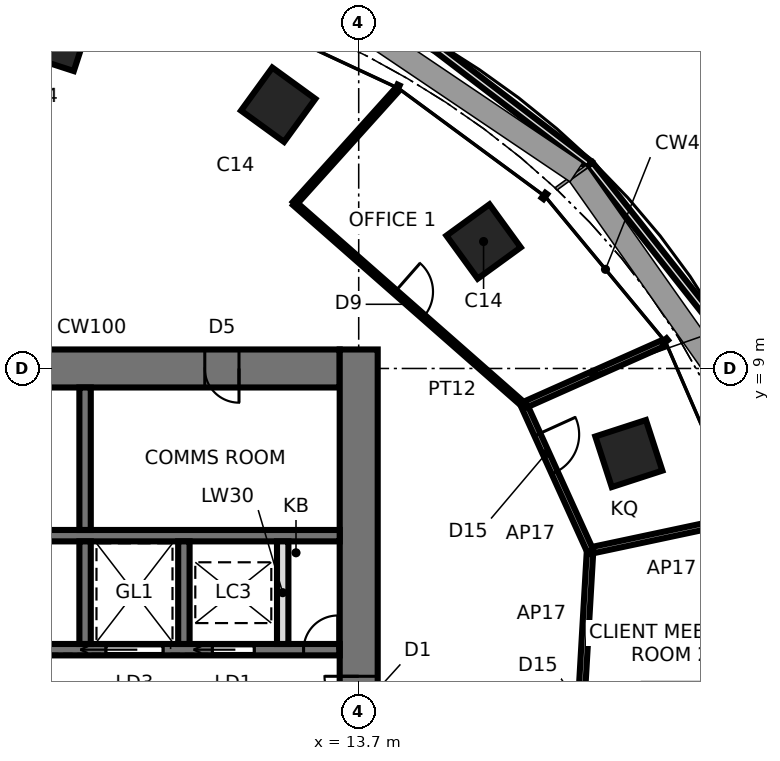
"""IFC4 building model, lengths in metres.
Left out: names, types, materials, properties, quantities, classifications, styles, units other than length and angle.
Written with IfcOpenShell. Run it as: python <this file> out.ifc"""

import sys

from ifc_helpers import new_model, si_unit, direction, frame, frame_2d, origin, origin_2d, place, context, subcontext, project, spatial, rectangle, extrude, element, fill, save


model = new_model("IFC4")
c1 = context("Model", 3, precision=1e-05, world=origin(), true_north=direction((0.0, 1.0)))
c2 = subcontext(c1, "Body", "Model", "MODEL_VIEW")
j1 = project(units=[si_unit("LENGTHUNIT", "METRE"), si_unit("PLANEANGLEUNIT", "RADIAN")], contexts=[c1])
p1 = place(None, origin())
s1 = spatial("IfcSite", under=j1, at=p1, CompositionType="ELEMENT")
p2 = place(p1, origin())
s2 = spatial("IfcBuilding", under=s1, at=p2, CompositionType="ELEMENT")
p3 = place(p2, frame((0.0, 0.0, 172.1)))
s3 = spatial("IfcBuildingStorey", under=s2, at=p3, CompositionType="ELEMENT", Elevation=172.1)
for number, where, z_axis, x_axis in (
    (1, (20.808, 6.761, 0.0), (0.0, 0.0, 1.0), (0.951, 0.309, 0.0)),
    (2, (16.986, 12.341, 0.0), (0.0, 0.0, 1.0), (0.809, 0.588, 0.0)),
    (3, (11.581, 15.94, 0.0), (0.0, 0.0, 1.0), (0.588, 0.809, 0.0)),
    (4, (5.754, 17.708, 0.0), (0.0, 0.0, 1.0), (0.309, 0.951, 0.0)),
):
    element("IfcColumn", number, at=place(p3, frame(where, z_axis=z_axis, x_axis=x_axis)), inside=s3, PredefinedType="COLUMN", context=c2, shape_type="SweptSolid", body=[
        extrude(rectangle(XDim=1.4, YDim=1.4, at=origin_2d()), origin(), (0.0, 0.0, 1.0), 3.9),
    ])
p4 = place(p3, frame((13.2, 9.0, 0.0), z_axis=(0.0, 0.0, 1.0), x_axis=(-1.0, 0.0, 0.0)))
e5 = element("IfcWall", 5, at=p4, inside=s3, PredefinedType="SHEAR", context=c2, shape_type="SweptSolid", body=[
    extrude(rectangle(XDim=26.4, YDim=1.0, at=frame_2d((13.2, 0.0))), origin(), (0.0, 0.0, 1.0), 3.9),
])
p5 = place(p4, frame((2.65, 0.0, 0.0)))
e6 = element("IfcOpeningElement", 6, at=p5, cuts=e5, PredefinedType="OPENING", context=c2, shape_type="SweptSolid", body=[
    extrude(rectangle(XDim=0.9, YDim=2.1, at=frame_2d((0.45, 1.05))), frame((0.0, 0.51, 0.0), z_axis=(0.0, -1.0, 0.0), x_axis=(1.0, 0.0, 0.0)), (0.0, 0.0, 1.0), 1.02),
])
p6 = place(p4, frame((9.5, 0.0, 0.0)))
e7 = element("IfcOpeningElement", 7, at=p6, cuts=e5, PredefinedType="OPENING", context=c2, shape_type="SweptSolid", body=[
    extrude(rectangle(XDim=0.9, YDim=2.1, at=frame_2d((0.45, 1.05))), frame((0.0, 0.51, 0.0), z_axis=(0.0, -1.0, 0.0), x_axis=(1.0, 0.0, 0.0)), (0.0, 0.0, 1.0), 1.02),
])
p7 = place(p4, frame((16.0, 0.0, 0.0)))
e8 = element("IfcOpeningElement", 8, at=p7, cuts=e5, PredefinedType="OPENING", context=c2, shape_type="SweptSolid", body=[
    extrude(rectangle(XDim=0.9, YDim=2.1, at=frame_2d((0.45, 1.05))), frame((0.0, 0.51, 0.0), z_axis=(0.0, -1.0, 0.0), x_axis=(1.0, 0.0, 0.0)), (0.0, 0.0, 1.0), 1.02),
])
p8 = place(p4, frame((21.25, 0.0, 0.0)))
e9 = element("IfcOpeningElement", 9, at=p8, cuts=e5, PredefinedType="OPENING", context=c2, shape_type="SweptSolid", body=[
    extrude(rectangle(XDim=0.9, YDim=2.1, at=frame_2d((0.45, 1.05))), frame((0.0, 0.51, 0.0), z_axis=(0.0, -1.0, 0.0), x_axis=(1.0, 0.0, 0.0)), (0.0, 0.0, 1.0), 1.02),
])
p9 = place(p4, frame((24.8, 0.0, 0.0)))
e10 = element("IfcOpeningElement", 10, at=p9, cuts=e5, PredefinedType="OPENING", context=c2, shape_type="SweptSolid", body=[
    extrude(rectangle(XDim=1.0, YDim=2.1, at=frame_2d((0.5, 1.05))), frame((0.0, 0.51, 0.0), z_axis=(0.0, -1.0, 0.0), x_axis=(1.0, 0.0, 0.0)), (0.0, 0.0, 1.0), 1.02),
])
p10 = place(p3, frame((13.7, -9.5, 0.0), z_axis=(0.0, 0.0, 1.0), x_axis=(0.0, 1.0, 0.0)))
e11 = element("IfcWall", 11, at=p10, inside=s3, PredefinedType="SHEAR", context=c2, shape_type="SweptSolid", body=[
    extrude(rectangle(XDim=19.0, YDim=1.0, at=frame_2d((9.5, 0.0))), origin(), (0.0, 0.0, 1.0), 3.9),
])
p11 = place(p10, frame((8.6, 0.0, 0.0)))
e12 = element("IfcOpeningElement", 12, at=p11, cuts=e11, PredefinedType="OPENING", context=c2, shape_type="SweptSolid", body=[
    extrude(rectangle(XDim=1.8, YDim=2.4, at=frame_2d((0.9, 1.2))), frame((0.0, 0.51, 0.0), z_axis=(0.0, -1.0, 0.0), x_axis=(1.0, 0.0, 0.0)), (0.0, 0.0, 1.0), 1.02),
])
p12 = place(p3, frame((-13.2, 1.6, 0.0), z_axis=(0.0, 0.0, 1.0), x_axis=(1.0, 0.0, 0.0)))
e13 = element("IfcWall", 13, at=p12, inside=s3, PredefinedType="SHEAR", context=c2, shape_type="SweptSolid", body=[
    extrude(rectangle(XDim=26.4, YDim=0.3, at=frame_2d((13.2, 0.0))), origin(), (0.0, 0.0, 1.0), 3.9),
])
p13 = place(p12, frame((0.25, 0.0, 0.0)))
e14 = element("IfcOpeningElement", 14, at=p13, cuts=e13, PredefinedType="OPENING", context=c2, shape_type="SweptSolid", body=[
    extrude(rectangle(XDim=1.0, YDim=2.1, at=frame_2d((0.5, 1.05))), frame((0.0, 0.16, 0.0), z_axis=(0.0, -1.0, 0.0), x_axis=(1.0, 0.0, 0.0)), (0.0, 0.0, 1.0), 0.32),
])
p14 = place(p12, frame((23.05, 0.0, 0.0)))
e15 = element("IfcOpeningElement", 15, at=p14, cuts=e13, PredefinedType="OPENING", context=c2, shape_type="SweptSolid", body=[
    extrude(rectangle(XDim=1.1, YDim=2.3, at=frame_2d((0.55, 1.15))), frame((0.0, 0.16, 0.0), z_axis=(0.0, -1.0, 0.0), x_axis=(1.0, 0.0, 0.0)), (0.0, 0.0, 1.0), 0.32),
])
p15 = place(p12, frame((20.25, 0.0, 0.0)))
e16 = element("IfcOpeningElement", 16, at=p15, cuts=e13, PredefinedType="OPENING", context=c2, shape_type="SweptSolid", body=[
    extrude(rectangle(XDim=1.5, YDim=2.4, at=frame_2d((0.75, 1.2))), frame((0.0, 0.16, 0.0), z_axis=(0.0, -1.0, 0.0), x_axis=(1.0, 0.0, 0.0)), (0.0, 0.0, 1.0), 0.32),
])
p16 = place(p12, frame((6.95, 0.0, 0.0)))
e17 = element("IfcOpeningElement", 17, at=p16, cuts=e13, PredefinedType="OPENING", context=c2, shape_type="SweptSolid", body=[
    extrude(rectangle(XDim=0.9, YDim=2.1, at=frame_2d((0.45, 1.05))), frame((0.0, 0.16, 0.0), z_axis=(0.0, -1.0, 0.0), x_axis=(1.0, 0.0, 0.0)), (0.0, 0.0, 1.0), 0.32),
])
p17 = place(p12, frame((10.15, 0.0, 0.0)))
e18 = element("IfcOpeningElement", 18, at=p17, cuts=e13, PredefinedType="OPENING", context=c2, shape_type="SweptSolid", body=[
    extrude(rectangle(XDim=0.9, YDim=2.1, at=frame_2d((0.45, 1.05))), frame((0.0, 0.16, 0.0), z_axis=(0.0, -1.0, 0.0), x_axis=(1.0, 0.0, 0.0)), (0.0, 0.0, 1.0), 0.32),
])
p18 = place(p12, frame((12.15, 0.0, 0.0)))
e19 = element("IfcOpeningElement", 19, at=p18, cuts=e13, PredefinedType="OPENING", context=c2, shape_type="SweptSolid", body=[
    extrude(rectangle(XDim=0.9, YDim=2.1, at=frame_2d((0.45, 1.05))), frame((0.0, 0.16, 0.0), z_axis=(0.0, -1.0, 0.0), x_axis=(1.0, 0.0, 0.0)), (0.0, 0.0, 1.0), 0.32),
])
p19 = place(p12, frame((25.45, 0.0, 0.0)))
e20 = element("IfcOpeningElement", 20, at=p19, cuts=e13, PredefinedType="OPENING", context=c2, shape_type="SweptSolid", body=[
    extrude(rectangle(XDim=0.9, YDim=2.1, at=frame_2d((0.45, 1.05))), frame((0.0, 0.16, 0.0), z_axis=(0.0, -1.0, 0.0), x_axis=(1.0, 0.0, 0.0)), (0.0, 0.0, 1.0), 0.32),
])
p20 = place(p3, frame((-13.2, 4.6, 0.0), z_axis=(0.0, 0.0, 1.0), x_axis=(1.0, 0.0, 0.0)))
e21 = element("IfcWall", 21, at=p20, inside=s3, PredefinedType="SHEAR", context=c2, shape_type="SweptSolid", body=[
    extrude(rectangle(XDim=26.4, YDim=0.3, at=frame_2d((13.2, 0.0))), origin(), (0.0, 0.0, 1.0), 3.9),
])
p21 = place(p3, frame((6.5, 1.75, 0.0), z_axis=(0.0, 0.0, 1.0), x_axis=(0.0, 1.0, 0.0)))
e22 = element("IfcWall", 22, at=p21, inside=s3, PredefinedType="SHEAR", context=c2, shape_type="SweptSolid", body=[
    extrude(rectangle(XDim=2.7, YDim=0.3, at=frame_2d((1.35, 0.0))), origin(), (0.0, 0.0, 1.0), 3.9),
])
p22 = place(p3, frame((6.5, 4.75, 0.0), z_axis=(0.0, 0.0, 1.0), x_axis=(0.0, 1.0, 0.0)))
e23 = element("IfcWall", 23, at=p22, inside=s3, PredefinedType="SHEAR", context=c2, shape_type="SweptSolid", body=[
    extrude(rectangle(XDim=3.75, YDim=0.3, at=frame_2d((1.875, 0.0))), origin(), (0.0, 0.0, 1.0), 3.9),
])
p23 = place(p3, frame((9.1, 1.75, 0.0), z_axis=(0.0, 0.0, 1.0), x_axis=(0.0, 1.0, 0.0)))
e24 = element("IfcWall", 24, at=p23, inside=s3, PredefinedType="SHEAR", context=c2, shape_type="SweptSolid", body=[
    extrude(rectangle(XDim=2.7, YDim=0.3, at=frame_2d((1.35, 0.0))), origin(), (0.0, 0.0, 1.0), 3.9),
])
p24 = place(p3, frame((23.025, 10.251, 0.0), z_axis=(0.0, 0.0, 1.0), x_axis=(-0.620234251815, 0.784416644951, 0.0)))
e25 = element("IfcWall", 25, at=p24, inside=s3, PredefinedType="PARAPET", context=c2, shape_type="SweptSolid", body=[
    extrude(rectangle(XDim=5.245, YDim=0.2, at=frame_2d((2.622, 0.0))), origin(), (0.0, 0.0, 1.0), 1.1),
])
p25 = place(p3, frame((19.772, 14.365, 0.0), z_axis=(0.0, 0.0, 1.0), x_axis=(-0.794914779667, 0.606721099902, 0.0)))
e26 = element("IfcWall", 26, at=p25, inside=s3, PredefinedType="PARAPET", context=c2, shape_type="SweptSolid", body=[
    extrude(rectangle(XDim=5.098, YDim=0.2, at=frame_2d((2.549, 0.0))), origin(), (0.0, 0.0, 1.0), 1.1),
])
p26 = place(p3, frame((11.7, 1.75, 0.0), z_axis=(0.0, 0.0, 1.0), x_axis=(0.0, 1.0, 0.0)))
e27 = element("IfcWall", 27, at=p26, inside=s3, PredefinedType="SOLIDWALL", context=c2, shape_type="SweptSolid", body=[
    extrude(rectangle(XDim=2.7, YDim=0.3, at=frame_2d((1.35, 0.0))), origin(), (0.0, 0.0, 1.0), 3.74),
])
p27 = place(p3, frame((19.788, 4.206, 0.0), z_axis=(0.0, 0.0, 1.0), x_axis=(-0.0579293499, -0.998320685161, 0.0)))
e28 = element("IfcWall", 28, at=p27, inside=s3, PredefinedType="PARTITIONING", context=c2, shape_type="SweptSolid", body=[
    extrude(rectangle(XDim=8.323, YDim=0.17, at=frame_2d((4.162, 0.0))), origin(), (0.0, 0.0, 1.0), 3.74),
])
p28 = place(p27, frame((3.612, 0.0, 0.0)))
e29 = element("IfcOpeningElement", 29, at=p28, cuts=e28, PredefinedType="OPENING", context=c2, shape_type="SweptSolid", body=[
    extrude(rectangle(XDim=1.1, YDim=2.4, at=frame_2d((0.55, 1.2))), frame((0.0, 0.095, 0.0), z_axis=(0.0, -1.0, 0.0), x_axis=(1.0, 0.0, 0.0)), (0.0, 0.0, 1.0), 0.19),
])
p29 = place(p3, frame((19.788, 4.206, 0.0), z_axis=(0.0, 0.0, 1.0), x_axis=(0.978152955943, 0.207886494942, 0.0)))
e30 = element("IfcWall", 30, at=p29, inside=s3, PredefinedType="PARTITIONING", context=c2, shape_type="SweptSolid", body=[
    extrude(rectangle(XDim=4.0, YDim=0.17, at=frame_2d((2.0, 0.0))), origin(), (0.0, 0.0, 1.0), 3.74),
])
p30 = place(p3, frame((18.049, 8.036, 0.0), z_axis=(0.0, 0.0, 1.0), x_axis=(0.413444314282, -0.910529405889, 0.0)))
e31 = element("IfcWall", 31, at=p30, inside=s3, PredefinedType="PARTITIONING", context=c2, shape_type="SweptSolid", body=[
    extrude(rectangle(XDim=4.206, YDim=0.17, at=frame_2d((2.103, 0.0))), origin(), (0.0, 0.0, 1.0), 3.74),
])
p31 = place(p30, frame((0.851, 0.0, 0.0)))
e32 = element("IfcOpeningElement", 32, at=p31, cuts=e31, PredefinedType="OPENING", context=c2, shape_type="SweptSolid", body=[
    extrude(rectangle(XDim=1.1, YDim=2.4, at=frame_2d((0.55, 1.2))), frame((0.0, 0.095, 0.0), z_axis=(0.0, -1.0, 0.0), x_axis=(1.0, 0.0, 0.0)), (0.0, 0.0, 1.0), 0.19),
])
p32 = place(p3, frame((18.049, 8.036, 0.0), z_axis=(0.0, 0.0, 1.0), x_axis=(0.913539509426, 0.406750002727, 0.0)))
e33 = element("IfcWall", 33, at=p32, inside=s3, PredefinedType="PARTITIONING", context=c2, shape_type="SweptSolid", body=[
    extrude(rectangle(XDim=4.0, YDim=0.17, at=frame_2d((2.0, 0.0))), origin(), (0.0, 0.0, 1.0), 3.74),
])
p33 = place(p3, frame((12.013, 13.342, 0.0), z_axis=(0.0, 0.0, 1.0), x_axis=(0.751063552333, -0.66022991477, 0.0)))
e34 = element("IfcWall", 34, at=p33, inside=s3, PredefinedType="PARTITIONING", context=c2, shape_type="SweptSolid", body=[
    extrude(rectangle(XDim=8.036, YDim=0.12, at=frame_2d((4.018, 0.0))), origin(), (0.0, 0.0, 1.0), 3.74),
])
p34 = place(p33, frame((3.518, 0.0, 0.0)))
e35 = element("IfcOpeningElement", 35, at=p34, cuts=e34, PredefinedType="OPENING", context=c2, shape_type="SweptSolid", body=[
    extrude(rectangle(XDim=1.0, YDim=2.4, at=frame_2d((0.5, 1.2))), frame((0.0, 0.07, 0.0), z_axis=(0.0, -1.0, 0.0), x_axis=(1.0, 0.0, 0.0)), (0.0, 0.0, 1.0), 0.14),
])
p35 = place(p3, frame((14.689, 16.314, 0.0), z_axis=(0.0, 0.0, 1.0), x_axis=(-0.669119832037, -0.743154526579, 0.0)))
e36 = element("IfcWall", 36, at=p35, inside=s3, PredefinedType="PARTITIONING", context=c2, shape_type="SweptSolid", body=[
    extrude(rectangle(XDim=4.0, YDim=0.12, at=frame_2d((2.0, 0.0))), origin(), (0.0, 0.0, 1.0), 3.74),
])
p36 = place(p11, origin())
e37 = element("IfcDoor", 37, at=p36, inside=s3, OperationType="DOUBLE_DOOR_SINGLE_SWING", PredefinedType="DOOR", context=c2, shape_type="SweptSolid", body=[
    extrude(rectangle(XDim=1.72, YDim=2.36, at=frame_2d((0.9, 1.18))), frame((0.0, 0.025, 0.0), z_axis=(0.0, -1.0, 0.0), x_axis=(1.0, 0.0, 0.0)), (0.0, 0.0, 1.0), 0.05),
    extrude(rectangle(XDim=0.04, YDim=2.4, at=frame_2d((0.02, 1.2))), frame((0.0, 0.25, 0.0), z_axis=(0.0, -1.0, 0.0), x_axis=(1.0, 0.0, 0.0)), (0.0, 0.0, 1.0), 0.5),
    extrude(rectangle(XDim=0.04, YDim=2.4, at=frame_2d((1.78, 1.2))), frame((0.0, 0.25, 0.0), z_axis=(0.0, -1.0, 0.0), x_axis=(1.0, 0.0, 0.0)), (0.0, 0.0, 1.0), 0.5),
    extrude(rectangle(XDim=1.72, YDim=0.04, at=frame_2d((0.9, 2.38))), frame((0.0, 0.25, 0.0), z_axis=(0.0, -1.0, 0.0), x_axis=(1.0, 0.0, 0.0)), (0.0, 0.0, 1.0), 0.5),
])
fill(e12, e37)
p37 = place(p14, origin())
e38 = element("IfcDoor", 38, at=p37, inside=s3, OperationType="SLIDING_TO_LEFT", PredefinedType="DOOR", context=c2, shape_type="SweptSolid", body=[
    extrude(rectangle(XDim=1.1, YDim=2.3, at=frame_2d((0.55, 1.15))), frame((0.0, 0.025, 0.0), z_axis=(0.0, -1.0, 0.0), x_axis=(1.0, 0.0, 0.0)), (0.0, 0.0, 1.0), 0.05),
])
fill(e15, e38)
p38 = place(p15, origin())
e39 = element("IfcDoor", 39, at=p38, inside=s3, OperationType="SLIDING_TO_LEFT", PredefinedType="DOOR", context=c2, shape_type="SweptSolid", body=[
    extrude(rectangle(XDim=1.5, YDim=2.4, at=frame_2d((0.75, 1.2))), frame((0.0, 0.025, 0.0), z_axis=(0.0, -1.0, 0.0), x_axis=(1.0, 0.0, 0.0)), (0.0, 0.0, 1.0), 0.05),
])
fill(e16, e39)
p39 = place(p19, origin())
e40 = element("IfcDoor", 40, at=p39, inside=s3, OperationType="SINGLE_SWING_RIGHT", PredefinedType="DOOR", context=c2, shape_type="SweptSolid", body=[
    extrude(rectangle(XDim=0.9, YDim=2.1, at=frame_2d((0.45, 1.05))), frame((0.0, 0.025, 0.0), z_axis=(0.0, -1.0, 0.0), x_axis=(1.0, 0.0, 0.0)), (0.0, 0.0, 1.0), 0.05),
])
fill(e20, e40)
p40 = place(p5, origin())
e41 = element("IfcDoor", 41, at=p40, inside=s3, OperationType="SINGLE_SWING_LEFT", PredefinedType="DOOR", context=c2, shape_type="SweptSolid", body=[
    extrude(rectangle(XDim=0.82, YDim=2.06, at=frame_2d((0.45, 1.03))), frame((0.0, 0.025, 0.0), z_axis=(0.0, -1.0, 0.0), x_axis=(1.0, 0.0, 0.0)), (0.0, 0.0, 1.0), 0.05),
    extrude(rectangle(XDim=0.04, YDim=2.1, at=frame_2d((0.02, 1.05))), frame((0.0, 0.25, 0.0), z_axis=(0.0, -1.0, 0.0), x_axis=(1.0, 0.0, 0.0)), (0.0, 0.0, 1.0), 0.5),
    extrude(rectangle(XDim=0.04, YDim=2.1, at=frame_2d((0.88, 1.05))), frame((0.0, 0.25, 0.0), z_axis=(0.0, -1.0, 0.0), x_axis=(1.0, 0.0, 0.0)), (0.0, 0.0, 1.0), 0.5),
    extrude(rectangle(XDim=0.82, YDim=0.04, at=frame_2d((0.45, 2.08))), frame((0.0, 0.25, 0.0), z_axis=(0.0, -1.0, 0.0), x_axis=(1.0, 0.0, 0.0)), (0.0, 0.0, 1.0), 0.5),
])
fill(e6, e41)
p41 = place(p31, origin())
e42 = element("IfcDoor", 42, at=p41, inside=s3, OperationType="SINGLE_SWING_LEFT", PredefinedType="DOOR", context=c2, shape_type="SweptSolid", body=[
    extrude(rectangle(XDim=1.1, YDim=2.4, at=frame_2d((0.55, 1.2))), frame((0.0, 0.025, 0.0), z_axis=(0.0, -1.0, 0.0), x_axis=(1.0, 0.0, 0.0)), (0.0, 0.0, 1.0), 0.05),
])
fill(e32, e42)
p42 = place(p34, origin())
e43 = element("IfcDoor", 43, at=p42, inside=s3, OperationType="SINGLE_SWING_LEFT", PredefinedType="DOOR", context=c2, shape_type="SweptSolid", body=[
    extrude(rectangle(XDim=1.0, YDim=2.4, at=frame_2d((0.5, 1.2))), frame((0.0, 0.025, 0.0), z_axis=(0.0, -1.0, 0.0), x_axis=(1.0, 0.0, 0.0)), (0.0, 0.0, 1.0), 0.05),
])
fill(e35, e43)
save(model, sys.argv[1])
